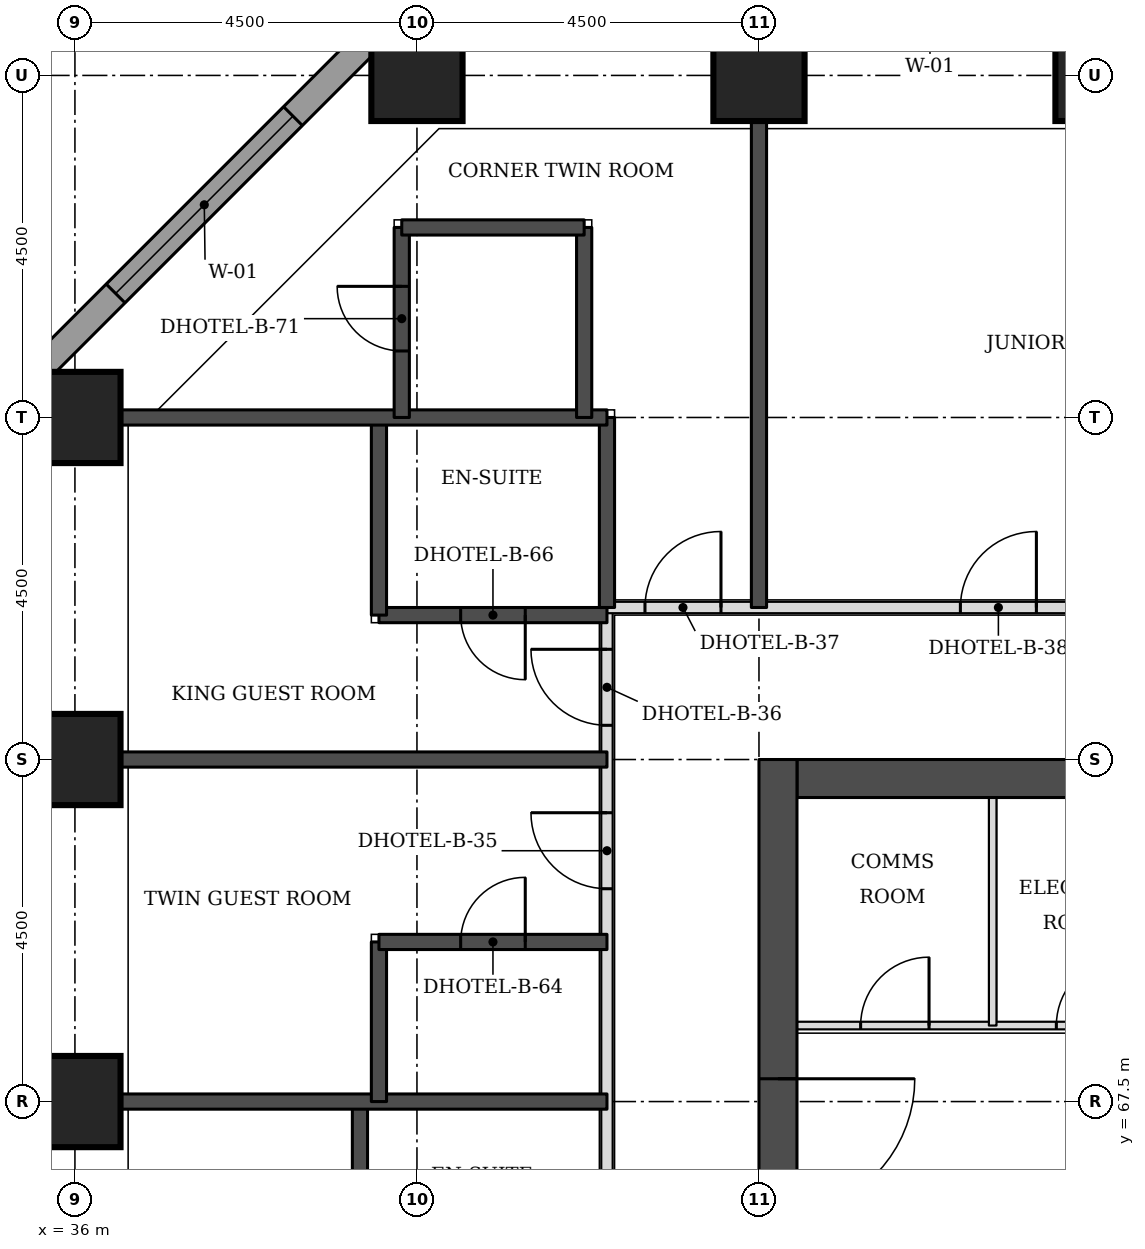
"""IFC4 building model, lengths in metres.
Left out: names, types, materials, properties, quantities, classifications, styles, units other than length and angle.
Written with IfcOpenShell. Run it as: python <this file> out.ifc"""

import sys

from ifc_helpers import new_model, si_unit, direction, frame, frame_2d, origin, origin_2d, place, context, subcontext, project, spatial, rectangle, extrude, element, fill, save


model = new_model("IFC4")
c1 = context("Model", 3, precision=1e-05, world=origin(), true_north=direction((0.0, 1.0)))
c2 = subcontext(c1, "Body", "Model", "MODEL_VIEW")
j1 = project(units=[si_unit("LENGTHUNIT", "METRE"), si_unit("PLANEANGLEUNIT", "RADIAN")], contexts=[c1])
p1 = place(None, origin())
s1 = spatial("IfcSite", under=j1, at=p1, CompositionType="ELEMENT")
p2 = place(p1, origin())
s2 = spatial("IfcBuilding", under=s1, at=p2, CompositionType="ELEMENT")
p3 = place(p2, frame((0.0, 0.0, 52.8)))
s3 = spatial("IfcBuildingStorey", under=s2, at=p3, CompositionType="ELEMENT", Elevation=52.8)
for number, where, z_axis, x_axis in (
    (1, (36.0, 67.5, 0.0), (0.0, 0.0, 1.0), (1.0, 0.0, 0.0)),
    (2, (36.0, 72.0, 0.0), (0.0, 0.0, 1.0), (1.0, 0.0, 0.0)),
    (3, (36.0, 76.5, 0.0), (0.0, 0.0, 1.0), (1.0, 0.0, 0.0)),
    (4, (40.5, 81.0, 0.0), (0.0, 0.0, 1.0), (1.0, 0.0, 0.0)),
    (5, (45.0, 81.0, 0.0), (0.0, 0.0, 1.0), (1.0, 0.0, 0.0)),
    (6, (49.5, 81.0, 0.0), (0.0, 0.0, 1.0), (1.0, 0.0, 0.0)),
):
    element("IfcColumn", number, at=place(p3, frame(where, z_axis=z_axis, x_axis=x_axis)), inside=s3, PredefinedType="COLUMN", context=c2, shape_type="SweptSolid", body=[
        extrude(rectangle(XDim=1.2, YDim=1.2, at=origin_2d()), origin(), (0.0, 0.0, 1.0), 3.3),
    ])
p4 = place(p3, frame((45.5, 71.75, 0.0), z_axis=(0.0, 0.0, 1.0), x_axis=(1.0, 0.0, 0.0)))
e7 = element("IfcWall", 7, at=p4, inside=s3, PredefinedType="SHEAR", context=c2, shape_type="SweptSolid", body=[
    extrude(rectangle(XDim=21.5, YDim=0.5, at=frame_2d((10.75, 0.0))), origin(), (0.0, 0.0, 1.0), 3.3),
])
p5 = place(p3, frame((45.25, 49.5, 0.0), z_axis=(0.0, 0.0, 1.0), x_axis=(0.0, 1.0, 0.0)))
e8 = element("IfcWall", 8, at=p5, inside=s3, PredefinedType="SHEAR", context=c2, shape_type="SweptSolid", body=[
    extrude(rectangle(XDim=22.5, YDim=0.5, at=frame_2d((11.25, 0.0))), origin(), (0.0, 0.0, 1.0), 3.3),
])
p6 = place(p5, frame((4.2, 0.0, 0.0)))
e9 = element("IfcOpeningElement", 9, at=p6, cuts=e8, PredefinedType="OPENING", context=c2, shape_type="SweptSolid", body=[
    extrude(rectangle(XDim=1.8, YDim=2.1, at=frame_2d((0.9, 1.05))), frame((0.0, 0.26, 0.0), z_axis=(0.0, -1.0, 0.0), x_axis=(1.0, 0.0, 0.0)), (0.0, 0.0, 1.0), 0.52),
])
p7 = place(p5, frame((6.9, 0.0, 0.0)))
e10 = element("IfcOpeningElement", 10, at=p7, cuts=e8, PredefinedType="OPENING", context=c2, shape_type="SweptSolid", body=[
    extrude(rectangle(XDim=1.1, YDim=2.1, at=frame_2d((0.55, 1.05))), frame((0.0, 0.26, 0.0), z_axis=(0.0, -1.0, 0.0), x_axis=(1.0, 0.0, 0.0)), (0.0, 0.0, 1.0), 0.52),
])
p8 = place(p5, frame((13.6, 0.0, 0.0)))
e11 = element("IfcOpeningElement", 11, at=p8, cuts=e8, PredefinedType="OPENING", context=c2, shape_type="SweptSolid", body=[
    extrude(rectangle(XDim=1.1, YDim=2.1, at=frame_2d((0.55, 1.05))), frame((0.0, 0.26, 0.0), z_axis=(0.0, -1.0, 0.0), x_axis=(1.0, 0.0, 0.0)), (0.0, 0.0, 1.0), 0.52),
])
p9 = place(p5, frame((16.5, 0.0, 0.0)))
e12 = element("IfcOpeningElement", 12, at=p9, cuts=e8, PredefinedType="OPENING", context=c2, shape_type="SweptSolid", body=[
    extrude(rectangle(XDim=1.8, YDim=2.1, at=frame_2d((0.9, 1.05))), frame((0.0, 0.26, 0.0), z_axis=(0.0, -1.0, 0.0), x_axis=(1.0, 0.0, 0.0)), (0.0, 0.0, 1.0), 0.52),
])
p10 = place(p3, frame((40.23, 81.826, 0.0), z_axis=(0.0, 0.0, 1.0), x_axis=(-0.707106781187, -0.707106781187, 0.0)))
e13 = element("IfcWall", 13, at=p10, inside=s3, PredefinedType="STANDARD", context=c2, shape_type="SweptSolid", body=[
    extrude(rectangle(XDim=7.151, YDim=0.35, at=frame_2d((3.576, 0.0))), origin(), (0.0, 0.0, 1.0), 3.055),
])
p11 = place(p10, frame((1.926, 0.0, 0.8)))
e14 = element("IfcOpeningElement", 14, at=p11, cuts=e13, PredefinedType="OPENING", context=c2, shape_type="SweptSolid", body=[
    extrude(rectangle(XDim=3.3, YDim=1.5, at=frame_2d((1.65, 0.75))), frame((0.0, 0.185, 0.0), z_axis=(0.0, -1.0, 0.0), x_axis=(1.0, 0.0, 0.0)), (0.0, 0.0, 1.0), 0.37),
])
p12 = place(p3, frame((43.0, 56.0, 0.0), z_axis=(0.0, 0.0, 1.0), x_axis=(0.0, 1.0, 0.0)))
e15 = element("IfcWall", 15, at=p12, inside=s3, PredefinedType="PARTITIONING", context=c2, shape_type="SweptSolid", body=[
    extrude(rectangle(XDim=18.0, YDim=0.15, at=frame_2d((9.0, 0.0))), origin(), (0.0, 0.0, 1.0), 3.08),
])
p13 = place(p12, frame((7.45, 0.0, 0.0)))
e16 = element("IfcOpeningElement", 16, at=p13, cuts=e15, PredefinedType="OPENING", context=c2, shape_type="SweptSolid", body=[
    extrude(rectangle(XDim=1.0, YDim=2.1, at=frame_2d((0.5, 1.05))), frame((0.0, 0.085, 0.0), z_axis=(0.0, -1.0, 0.0), x_axis=(1.0, 0.0, 0.0)), (0.0, 0.0, 1.0), 0.17),
])
p14 = place(p12, frame((14.3, 0.0, 0.0)))
e17 = element("IfcOpeningElement", 17, at=p14, cuts=e15, PredefinedType="OPENING", context=c2, shape_type="SweptSolid", body=[
    extrude(rectangle(XDim=1.0, YDim=2.1, at=frame_2d((0.5, 1.05))), frame((0.0, 0.085, 0.0), z_axis=(0.0, -1.0, 0.0), x_axis=(1.0, 0.0, 0.0)), (0.0, 0.0, 1.0), 0.17),
])
p15 = place(p12, frame((16.45, 0.0, 0.0)))
e18 = element("IfcOpeningElement", 18, at=p15, cuts=e15, PredefinedType="OPENING", context=c2, shape_type="SweptSolid", body=[
    extrude(rectangle(XDim=1.0, YDim=2.1, at=frame_2d((0.5, 1.05))), frame((0.0, 0.085, 0.0), z_axis=(0.0, -1.0, 0.0), x_axis=(1.0, 0.0, 0.0)), (0.0, 0.0, 1.0), 0.17),
])
p16 = place(p12, frame((3.05, 0.0, 0.0)))
e19 = element("IfcOpeningElement", 19, at=p16, cuts=e15, PredefinedType="OPENING", context=c2, shape_type="SweptSolid", body=[
    extrude(rectangle(XDim=0.9, YDim=2.1, at=frame_2d((0.45, 1.05))), frame((0.0, 0.085, 0.0), z_axis=(0.0, -1.0, 0.0), x_axis=(1.0, 0.0, 0.0)), (0.0, 0.0, 1.0), 0.17),
])
p17 = place(p3, frame((43.0, 74.0, 0.0), z_axis=(0.0, 0.0, 1.0), x_axis=(1.0, 0.0, 0.0)))
e20 = element("IfcWall", 20, at=p17, inside=s3, PredefinedType="PARTITIONING", context=c2, shape_type="SweptSolid", body=[
    extrude(rectangle(XDim=26.5, YDim=0.15, at=frame_2d((13.25, 0.0))), origin(), (0.0, 0.0, 1.0), 3.08),
])
p18 = place(p17, frame((4.65, 0.0, 0.0)))
e21 = element("IfcOpeningElement", 21, at=p18, cuts=e20, PredefinedType="OPENING", context=c2, shape_type="SweptSolid", body=[
    extrude(rectangle(XDim=1.0, YDim=2.1, at=frame_2d((0.5, 1.05))), frame((0.0, 0.085, 0.0), z_axis=(0.0, -1.0, 0.0), x_axis=(1.0, 0.0, 0.0)), (0.0, 0.0, 1.0), 0.17),
])
p19 = place(p17, frame((16.6, 0.0, 0.0)))
e22 = element("IfcOpeningElement", 22, at=p19, cuts=e20, PredefinedType="OPENING", context=c2, shape_type="SweptSolid", body=[
    extrude(rectangle(XDim=1.0, YDim=2.1, at=frame_2d((0.5, 1.05))), frame((0.0, 0.085, 0.0), z_axis=(0.0, -1.0, 0.0), x_axis=(1.0, 0.0, 0.0)), (0.0, 0.0, 1.0), 0.17),
])
p20 = place(p17, frame((20.7, 0.0, 0.0)))
e23 = element("IfcOpeningElement", 23, at=p20, cuts=e20, PredefinedType="OPENING", context=c2, shape_type="SweptSolid", body=[
    extrude(rectangle(XDim=1.0, YDim=2.1, at=frame_2d((0.5, 1.05))), frame((0.0, 0.085, 0.0), z_axis=(0.0, -1.0, 0.0), x_axis=(1.0, 0.0, 0.0)), (0.0, 0.0, 1.0), 0.17),
])
p21 = place(p17, frame((0.5, 0.0, 0.0)))
e24 = element("IfcOpeningElement", 24, at=p21, cuts=e20, PredefinedType="OPENING", context=c2, shape_type="SweptSolid", body=[
    extrude(rectangle(XDim=1.0, YDim=2.1, at=frame_2d((0.5, 1.05))), frame((0.0, 0.085, 0.0), z_axis=(0.0, -1.0, 0.0), x_axis=(1.0, 0.0, 0.0)), (0.0, 0.0, 1.0), 0.17),
])
p22 = place(p17, frame((25.0, 0.0, 0.0)))
e25 = element("IfcOpeningElement", 25, at=p22, cuts=e20, PredefinedType="OPENING", context=c2, shape_type="SweptSolid", body=[
    extrude(rectangle(XDim=1.0, YDim=2.1, at=frame_2d((0.5, 1.05))), frame((0.0, 0.085, 0.0), z_axis=(0.0, -1.0, 0.0), x_axis=(1.0, 0.0, 0.0)), (0.0, 0.0, 1.0), 0.17),
])
p23 = place(p3, frame((39.75, 64.9, 0.0), z_axis=(0.0, 0.0, 1.0), x_axis=(0.0, 1.0, 0.0)))
e26 = element("IfcWall", 26, at=p23, inside=s3, PredefinedType="SOLIDWALL", context=c2, shape_type="SweptSolid", body=[
    extrude(rectangle(XDim=2.6, YDim=0.2, at=frame_2d((1.3, 0.0))), origin(), (0.0, 0.0, 1.0), 3.08),
])
p24 = place(p3, frame((36.6, 67.5, 0.0), z_axis=(0.0, 0.0, 1.0), x_axis=(1.0, 0.0, 0.0)))
e27 = element("IfcWall", 27, at=p24, inside=s3, PredefinedType="SOLIDWALL", context=c2, shape_type="SweptSolid", body=[
    extrude(rectangle(XDim=6.4, YDim=0.2, at=frame_2d((3.2, 0.0))), origin(), (0.0, 0.0, 1.0), 3.08),
])
p25 = place(p3, frame((40.0, 67.5, 0.0), z_axis=(0.0, 0.0, 1.0), x_axis=(0.0, 1.0, 0.0)))
e28 = element("IfcWall", 28, at=p25, inside=s3, PredefinedType="SOLIDWALL", context=c2, shape_type="SweptSolid", body=[
    extrude(rectangle(XDim=2.1, YDim=0.2, at=frame_2d((1.05, 0.0))), origin(), (0.0, 0.0, 1.0), 3.08),
])
p26 = place(p3, frame((40.0, 69.6, 0.0), z_axis=(0.0, 0.0, 1.0), x_axis=(1.0, 0.0, 0.0)))
e29 = element("IfcWall", 29, at=p26, inside=s3, PredefinedType="SOLIDWALL", context=c2, shape_type="SweptSolid", body=[
    extrude(rectangle(XDim=3.0, YDim=0.2, at=frame_2d((1.5, 0.0))), origin(), (0.0, 0.0, 1.0), 3.08),
])
p27 = place(p26, frame((1.075, 0.0, 0.0)))
e30 = element("IfcOpeningElement", 30, at=p27, cuts=e29, PredefinedType="OPENING", context=c2, shape_type="SweptSolid", body=[
    extrude(rectangle(XDim=0.85, YDim=2.1, at=frame_2d((0.425, 1.05))), frame((0.0, 0.11, 0.0), z_axis=(0.0, -1.0, 0.0), x_axis=(1.0, 0.0, 0.0)), (0.0, 0.0, 1.0), 0.22),
])
p28 = place(p3, frame((36.6, 72.0, 0.0), z_axis=(0.0, 0.0, 1.0), x_axis=(1.0, 0.0, 0.0)))
e31 = element("IfcWall", 31, at=p28, inside=s3, PredefinedType="SOLIDWALL", context=c2, shape_type="SweptSolid", body=[
    extrude(rectangle(XDim=6.4, YDim=0.2, at=frame_2d((3.2, 0.0))), origin(), (0.0, 0.0, 1.0), 3.08),
])
p29 = place(p3, frame((40.0, 73.9, 0.0), z_axis=(0.0, 0.0, 1.0), x_axis=(1.0, 0.0, 0.0)))
e32 = element("IfcWall", 32, at=p29, inside=s3, PredefinedType="SOLIDWALL", context=c2, shape_type="SweptSolid", body=[
    extrude(rectangle(XDim=3.0, YDim=0.2, at=frame_2d((1.5, 0.0))), origin(), (0.0, 0.0, 1.0), 3.08),
])
p30 = place(p29, frame((1.075, 0.0, 0.0)))
e33 = element("IfcOpeningElement", 33, at=p30, cuts=e32, PredefinedType="OPENING", context=c2, shape_type="SweptSolid", body=[
    extrude(rectangle(XDim=0.85, YDim=2.1, at=frame_2d((0.425, 1.05))), frame((0.0, 0.11, 0.0), z_axis=(0.0, -1.0, 0.0), x_axis=(1.0, 0.0, 0.0)), (0.0, 0.0, 1.0), 0.22),
])
p31 = place(p3, frame((40.0, 73.9, 0.0), z_axis=(0.0, 0.0, 1.0), x_axis=(0.0, 1.0, 0.0)))
e34 = element("IfcWall", 34, at=p31, inside=s3, PredefinedType="SOLIDWALL", context=c2, shape_type="SweptSolid", body=[
    extrude(rectangle(XDim=2.6, YDim=0.2, at=frame_2d((1.3, 0.0))), origin(), (0.0, 0.0, 1.0), 3.08),
])
p32 = place(p3, frame((43.0, 74.0, 0.0), z_axis=(0.0, 0.0, 1.0), x_axis=(0.0, 1.0, 0.0)))
e35 = element("IfcWall", 35, at=p32, inside=s3, PredefinedType="SOLIDWALL", context=c2, shape_type="SweptSolid", body=[
    extrude(rectangle(XDim=2.5, YDim=0.2, at=frame_2d((1.25, 0.0))), origin(), (0.0, 0.0, 1.0), 3.08),
])
for number, where, z_axis, x_axis in (
    (36, (45.0, 74.0, 0.0), (0.0, 0.0, 1.0), (0.0, 1.0, 0.0)),
    (37, (36.6, 76.5, 0.0), (0.0, 0.0, 1.0), (1.0, 0.0, 0.0)),
):
    element("IfcWall", number, at=place(p3, frame(where, z_axis=z_axis, x_axis=x_axis)), inside=s3, PredefinedType="SOLIDWALL", context=c2, shape_type="SweptSolid", body=[
        extrude(rectangle(XDim=6.4, YDim=0.2, at=frame_2d((3.2, 0.0))), origin(), (0.0, 0.0, 1.0), 3.08),
    ])
p33 = place(p3, frame((40.3, 76.5, 0.0), z_axis=(0.0, 0.0, 1.0), x_axis=(0.0, 1.0, 0.0)))
e38 = element("IfcWall", 38, at=p33, inside=s3, PredefinedType="SOLIDWALL", context=c2, shape_type="SweptSolid", body=[
    extrude(rectangle(XDim=2.5, YDim=0.2, at=frame_2d((1.25, 0.0))), origin(), (0.0, 0.0, 1.0), 3.08),
])
p34 = place(p33, frame((0.875, 0.0, 0.0)))
e39 = element("IfcOpeningElement", 39, at=p34, cuts=e38, PredefinedType="OPENING", context=c2, shape_type="SweptSolid", body=[
    extrude(rectangle(XDim=0.85, YDim=2.1, at=frame_2d((0.425, 1.05))), frame((0.0, 0.11, 0.0), z_axis=(0.0, -1.0, 0.0), x_axis=(1.0, 0.0, 0.0)), (0.0, 0.0, 1.0), 0.22),
])
p35 = place(p3, frame((42.7, 76.5, 0.0), z_axis=(0.0, 0.0, 1.0), x_axis=(0.0, 1.0, 0.0)))
e40 = element("IfcWall", 40, at=p35, inside=s3, PredefinedType="SOLIDWALL", context=c2, shape_type="SweptSolid", body=[
    extrude(rectangle(XDim=2.5, YDim=0.2, at=frame_2d((1.25, 0.0))), origin(), (0.0, 0.0, 1.0), 3.08),
])
p36 = place(p3, frame((40.3, 79.0, 0.0), z_axis=(0.0, 0.0, 1.0), x_axis=(1.0, 0.0, 0.0)))
e41 = element("IfcWall", 41, at=p36, inside=s3, PredefinedType="SOLIDWALL", context=c2, shape_type="SweptSolid", body=[
    extrude(rectangle(XDim=2.4, YDim=0.2, at=frame_2d((1.2, 0.0))), origin(), (0.0, 0.0, 1.0), 3.08),
])
p37 = place(p3, frame((45.5, 68.5, 0.0), z_axis=(0.0, 0.0, 1.0), x_axis=(1.0, 0.0, 0.0)))
e42 = element("IfcWall", 42, at=p37, inside=s3, PredefinedType="PARTITIONING", context=c2, shape_type="SweptSolid", body=[
    extrude(rectangle(XDim=5.15, YDim=0.1, at=frame_2d((2.575, 0.0))), origin(), (0.0, 0.0, 1.0), 3.08),
])
p38 = place(p37, frame((0.837, 0.0, 0.0)))
e43 = element("IfcOpeningElement", 43, at=p38, cuts=e42, PredefinedType="OPENING", context=c2, shape_type="SweptSolid", body=[
    extrude(rectangle(XDim=0.9, YDim=2.1, at=frame_2d((0.45, 1.05))), frame((0.0, 0.06, 0.0), z_axis=(0.0, -1.0, 0.0), x_axis=(1.0, 0.0, 0.0)), (0.0, 0.0, 1.0), 0.12),
])
p39 = place(p37, frame((3.413, 0.0, 0.0)))
e44 = element("IfcOpeningElement", 44, at=p39, cuts=e42, PredefinedType="OPENING", context=c2, shape_type="SweptSolid", body=[
    extrude(rectangle(XDim=0.9, YDim=2.1, at=frame_2d((0.45, 1.05))), frame((0.0, 0.06, 0.0), z_axis=(0.0, -1.0, 0.0), x_axis=(1.0, 0.0, 0.0)), (0.0, 0.0, 1.0), 0.12),
])
p40 = place(p3, frame((48.075, 68.5, 0.0), z_axis=(0.0, 0.0, 1.0), x_axis=(0.0, 1.0, 0.0)))
e45 = element("IfcWall", 45, at=p40, inside=s3, PredefinedType="PARTITIONING", context=c2, shape_type="SweptSolid", body=[
    extrude(rectangle(XDim=3.0, YDim=0.1, at=frame_2d((1.5, 0.0))), origin(), (0.0, 0.0, 1.0), 3.08),
])
p41 = place(p11, origin())
e46 = element("IfcWindow", 46, at=p41, inside=s3, PartitioningType="SINGLE_PANEL", PredefinedType="WINDOW", context=c2, shape_type="SweptSolid", body=[
    extrude(rectangle(XDim=3.3, YDim=1.5, at=frame_2d((1.65, 0.75))), frame((0.0, 0.085, 0.0), z_axis=(0.0, -1.0, 0.0), x_axis=(1.0, 0.0, 0.0)), (0.0, 0.0, 1.0), 0.06),
])
fill(e14, e46)
p42 = place(p14, origin())
e47 = element("IfcDoor", 47, at=p42, inside=s3, OperationType="SINGLE_SWING_RIGHT", PredefinedType="DOOR", context=c2, shape_type="SweptSolid", body=[
    extrude(rectangle(XDim=1.0, YDim=2.1, at=frame_2d((0.5, 1.05))), frame((0.0, 0.025, 0.0), z_axis=(0.0, -1.0, 0.0), x_axis=(1.0, 0.0, 0.0)), (0.0, 0.0, 1.0), 0.05),
])
fill(e17, e47)
p43 = place(p27, origin())
e48 = element("IfcDoor", 48, at=p43, inside=s3, OperationType="SINGLE_SWING_RIGHT", PredefinedType="DOOR", context=c2, shape_type="SweptSolid", body=[
    extrude(rectangle(XDim=0.85, YDim=2.1, at=frame_2d((0.425, 1.05))), frame((0.0, 0.025, 0.0), z_axis=(0.0, -1.0, 0.0), x_axis=(1.0, 0.0, 0.0)), (0.0, 0.0, 1.0), 0.05),
])
fill(e30, e48)
p44 = place(p15, origin())
e49 = element("IfcDoor", 49, at=p44, inside=s3, OperationType="SINGLE_SWING_RIGHT", PredefinedType="DOOR", context=c2, shape_type="SweptSolid", body=[
    extrude(rectangle(XDim=1.0, YDim=2.1, at=frame_2d((0.5, 1.05))), frame((0.0, 0.025, 0.0), z_axis=(0.0, -1.0, 0.0), x_axis=(1.0, 0.0, 0.0)), (0.0, 0.0, 1.0), 0.05),
])
fill(e18, e49)
p45 = place(p30, frame((0.85, 0.0, 0.0), z_axis=(0.0, 0.0, 1.0), x_axis=(-1.0, 0.0, 0.0)))
e50 = element("IfcDoor", 50, at=p45, inside=s3, OperationType="SINGLE_SWING_LEFT", PredefinedType="DOOR", context=c2, shape_type="SweptSolid", body=[
    extrude(rectangle(XDim=0.85, YDim=2.1, at=frame_2d((0.425, 1.05))), frame((0.0, 0.025, 0.0), z_axis=(0.0, -1.0, 0.0), x_axis=(1.0, 0.0, 0.0)), (0.0, 0.0, 1.0), 0.05),
])
fill(e33, e50)
p46 = place(p18, origin())
e51 = element("IfcDoor", 51, at=p46, inside=s3, OperationType="SINGLE_SWING_RIGHT", PredefinedType="DOOR", context=c2, shape_type="SweptSolid", body=[
    extrude(rectangle(XDim=1.0, YDim=2.1, at=frame_2d((0.5, 1.05))), frame((0.0, 0.025, 0.0), z_axis=(0.0, -1.0, 0.0), x_axis=(1.0, 0.0, 0.0)), (0.0, 0.0, 1.0), 0.05),
])
fill(e21, e51)
p47 = place(p21, origin())
e52 = element("IfcDoor", 52, at=p47, inside=s3, OperationType="SINGLE_SWING_RIGHT", PredefinedType="DOOR", context=c2, shape_type="SweptSolid", body=[
    extrude(rectangle(XDim=1.0, YDim=2.1, at=frame_2d((0.5, 1.05))), frame((0.0, 0.025, 0.0), z_axis=(0.0, -1.0, 0.0), x_axis=(1.0, 0.0, 0.0)), (0.0, 0.0, 1.0), 0.05),
])
fill(e24, e52)
p48 = place(p34, origin())
e53 = element("IfcDoor", 53, at=p48, inside=s3, OperationType="SINGLE_SWING_RIGHT", PredefinedType="DOOR", context=c2, shape_type="SweptSolid", body=[
    extrude(rectangle(XDim=0.85, YDim=2.1, at=frame_2d((0.425, 1.05))), frame((0.0, 0.025, 0.0), z_axis=(0.0, -1.0, 0.0), x_axis=(1.0, 0.0, 0.0)), (0.0, 0.0, 1.0), 0.05),
])
fill(e39, e53)
p49 = place(p9, frame((1.8, 0.0, 0.0), z_axis=(0.0, 0.0, 1.0), x_axis=(-1.0, 0.0, 0.0)))
e54 = element("IfcDoor", 54, at=p49, inside=s3, OperationType="SINGLE_SWING_LEFT", PredefinedType="DOOR", context=c2, shape_type="SweptSolid", body=[
    extrude(rectangle(XDim=1.8, YDim=2.1, at=frame_2d((0.9, 1.05))), frame((0.0, 0.025, 0.0), z_axis=(0.0, -1.0, 0.0), x_axis=(1.0, 0.0, 0.0)), (0.0, 0.0, 1.0), 0.05),
])
fill(e12, e54)
p50 = place(p38, origin())
e55 = element("IfcDoor", 55, at=p50, inside=s3, OperationType="SINGLE_SWING_RIGHT", PredefinedType="DOOR", context=c2, shape_type="SweptSolid", body=[
    extrude(rectangle(XDim=0.9, YDim=2.1, at=frame_2d((0.45, 1.05))), frame((0.0, 0.025, 0.0), z_axis=(0.0, -1.0, 0.0), x_axis=(1.0, 0.0, 0.0)), (0.0, 0.0, 1.0), 0.05),
])
fill(e43, e55)
p51 = place(p39, origin())
e56 = element("IfcDoor", 56, at=p51, inside=s3, OperationType="SINGLE_SWING_RIGHT", PredefinedType="DOOR", context=c2, shape_type="SweptSolid", body=[
    extrude(rectangle(XDim=0.9, YDim=2.1, at=frame_2d((0.45, 1.05))), frame((0.0, 0.025, 0.0), z_axis=(0.0, -1.0, 0.0), x_axis=(1.0, 0.0, 0.0)), (0.0, 0.0, 1.0), 0.05),
])
fill(e44, e56)
save(model, sys.argv[1])
